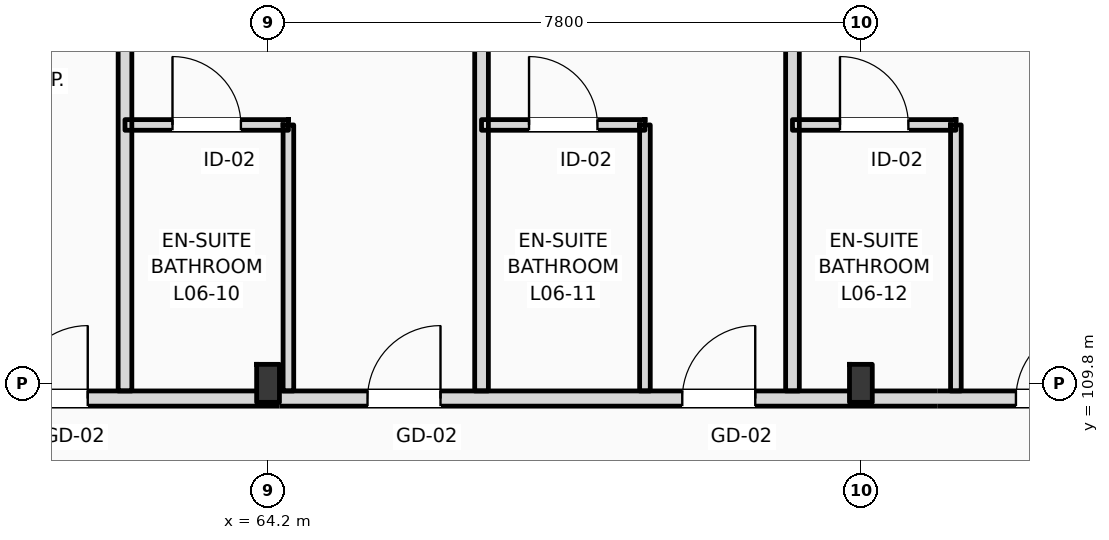
"""IFC4 building model, lengths in metres.
Left out: names, types, materials, properties, quantities, classifications, styles, units other than length and angle.
Written with IfcOpenShell. Run it as: python <this file> out.ifc"""

import sys

from ifc_helpers import new_model, si_unit, direction, frame, frame_2d, origin, origin_2d, place, context, subcontext, project, spatial, rectangle, i_section, extrude, element, fill, save


model = new_model("IFC4")
c1 = context("Model", 3, precision=1e-05, world=origin(), true_north=direction((0.0, 1.0)))
c2 = subcontext(c1, "Body", "Model", "MODEL_VIEW")
j1 = project(units=[si_unit("LENGTHUNIT", "METRE"), si_unit("PLANEANGLEUNIT", "RADIAN")], contexts=[c1])
p1 = place(None, origin())
s1 = spatial("IfcSite", under=j1, at=p1, CompositionType="ELEMENT")
p2 = place(p1, origin())
s2 = spatial("IfcBuilding", under=s1, at=p2, CompositionType="ELEMENT")
p3 = place(p2, frame((0.0, 0.0, 28.2)))
s3 = spatial("IfcBuildingStorey", under=s2, at=p3, CompositionType="ELEMENT", Elevation=28.2)
for number, where, z_axis, x_axis in (
    (1, (64.2, 109.8, 0.0), (0.0, 0.0, 1.0), (1.0, 0.0, 0.0)),
    (2, (72.0, 109.8, 0.0), (0.0, 0.0, 1.0), (1.0, 0.0, 0.0)),
):
    element("IfcColumn", number, at=place(p3, frame(where, z_axis=z_axis, x_axis=x_axis)), inside=s3, PredefinedType="COLUMN", context=c2, shape_type="SweptSolid", body=[
        extrude(i_section(OverallWidth=0.3, OverallDepth=0.5, WebThickness=0.014, FlangeThickness=0.028, FilletRadius=0.027, at=origin_2d()), origin(), (0.0, 0.0, 1.0), 3.6),
    ])
p4 = place(p3, frame((10.65, 109.6, 0.0), z_axis=(0.0, 0.0, 1.0), x_axis=(1.0, 0.0, 0.0)))
e3 = element("IfcWall", 3, at=p4, inside=s3, PredefinedType="PARTITIONING", context=c2, shape_type="SweptSolid", body=[
    extrude(rectangle(XDim=109.21, YDim=0.2, at=frame_2d((54.605, 0.0))), origin(), (0.0, 0.0, 1.0), 2.8),
])
p5 = place(p4, frame((12.611, 0.0, 0.0)))
e4 = element("IfcOpeningElement", 4, at=p5, cuts=e3, PredefinedType="OPENING", context=c2, shape_type="SweptSolid", body=[
    extrude(rectangle(XDim=1.02, YDim=2.2, at=frame_2d((0.51, 1.1))), frame((0.0, 0.11, 0.0), z_axis=(0.0, -1.0, 0.0), x_axis=(1.0, 0.0, 0.0)), (0.0, 0.0, 1.0), 0.22),
])
p6 = place(p4, frame((19.451, 0.0, 0.0)))
e5 = element("IfcOpeningElement", 5, at=p6, cuts=e3, PredefinedType="OPENING", context=c2, shape_type="SweptSolid", body=[
    extrude(rectangle(XDim=1.02, YDim=2.2, at=frame_2d((0.51, 1.1))), frame((0.0, 0.11, 0.0), z_axis=(0.0, -1.0, 0.0), x_axis=(1.0, 0.0, 0.0)), (0.0, 0.0, 1.0), 0.22),
])
p7 = place(p4, frame((23.842, 0.0, 0.0)))
e6 = element("IfcOpeningElement", 6, at=p7, cuts=e3, PredefinedType="OPENING", context=c2, shape_type="SweptSolid", body=[
    extrude(rectangle(XDim=1.02, YDim=2.2, at=frame_2d((0.51, 1.1))), frame((0.0, 0.11, 0.0), z_axis=(0.0, -1.0, 0.0), x_axis=(1.0, 0.0, 0.0)), (0.0, 0.0, 1.0), 0.22),
])
p8 = place(p4, frame((26.084, 0.0, 0.0)))
e7 = element("IfcOpeningElement", 7, at=p8, cuts=e3, PredefinedType="OPENING", context=c2, shape_type="SweptSolid", body=[
    extrude(rectangle(XDim=1.02, YDim=2.2, at=frame_2d((0.51, 1.1))), frame((0.0, 0.11, 0.0), z_axis=(0.0, -1.0, 0.0), x_axis=(1.0, 0.0, 0.0)), (0.0, 0.0, 1.0), 0.22),
])
p9 = place(p4, frame((32.655, 0.0, 0.0)))
e8 = element("IfcOpeningElement", 8, at=p9, cuts=e3, PredefinedType="OPENING", context=c2, shape_type="SweptSolid", body=[
    extrude(rectangle(XDim=0.96, YDim=2.2, at=frame_2d((0.48, 1.1))), frame((0.0, 0.11, 0.0), z_axis=(0.0, -1.0, 0.0), x_axis=(1.0, 0.0, 0.0)), (0.0, 0.0, 1.0), 0.22),
])
p10 = place(p4, frame((34.895, 0.0, 0.0)))
e9 = element("IfcOpeningElement", 9, at=p10, cuts=e3, PredefinedType="OPENING", context=c2, shape_type="SweptSolid", body=[
    extrude(rectangle(XDim=0.96, YDim=2.2, at=frame_2d((0.48, 1.1))), frame((0.0, 0.11, 0.0), z_axis=(0.0, -1.0, 0.0), x_axis=(1.0, 0.0, 0.0)), (0.0, 0.0, 1.0), 0.22),
])
p11 = place(p4, frame((41.436, 0.0, 0.0)))
e10 = element("IfcOpeningElement", 10, at=p11, cuts=e3, PredefinedType="OPENING", context=c2, shape_type="SweptSolid", body=[
    extrude(rectangle(XDim=0.96, YDim=2.2, at=frame_2d((0.48, 1.1))), frame((0.0, 0.11, 0.0), z_axis=(0.0, -1.0, 0.0), x_axis=(1.0, 0.0, 0.0)), (0.0, 0.0, 1.0), 0.22),
])
p12 = place(p4, frame((43.427, 0.0, 0.0)))
e11 = element("IfcOpeningElement", 11, at=p12, cuts=e3, PredefinedType="OPENING", context=c2, shape_type="SweptSolid", body=[
    extrude(rectangle(XDim=0.96, YDim=2.2, at=frame_2d((0.48, 1.1))), frame((0.0, 0.11, 0.0), z_axis=(0.0, -1.0, 0.0), x_axis=(1.0, 0.0, 0.0)), (0.0, 0.0, 1.0), 0.22),
])
p13 = place(p4, frame((50.218, 0.0, 0.0)))
e12 = element("IfcOpeningElement", 12, at=p13, cuts=e3, PredefinedType="OPENING", context=c2, shape_type="SweptSolid", body=[
    extrude(rectangle(XDim=0.96, YDim=2.2, at=frame_2d((0.48, 1.1))), frame((0.0, 0.11, 0.0), z_axis=(0.0, -1.0, 0.0), x_axis=(1.0, 0.0, 0.0)), (0.0, 0.0, 1.0), 0.22),
])
p14 = place(p4, frame((54.859, 0.0, 0.0)))
e13 = element("IfcOpeningElement", 13, at=p14, cuts=e3, PredefinedType="OPENING", context=c2, shape_type="SweptSolid", body=[
    extrude(rectangle(XDim=0.96, YDim=2.2, at=frame_2d((0.48, 1.1))), frame((0.0, 0.11, 0.0), z_axis=(0.0, -1.0, 0.0), x_axis=(1.0, 0.0, 0.0)), (0.0, 0.0, 1.0), 0.22),
])
p15 = place(p4, frame((59.0, 0.0, 0.0)))
e14 = element("IfcOpeningElement", 14, at=p15, cuts=e3, PredefinedType="OPENING", context=c2, shape_type="SweptSolid", body=[
    extrude(rectangle(XDim=0.96, YDim=2.2, at=frame_2d((0.48, 1.1))), frame((0.0, 0.11, 0.0), z_axis=(0.0, -1.0, 0.0), x_axis=(1.0, 0.0, 0.0)), (0.0, 0.0, 1.0), 0.22),
])
p16 = place(p4, frame((63.39, 0.0, 0.0)))
e15 = element("IfcOpeningElement", 15, at=p16, cuts=e3, PredefinedType="OPENING", context=c2, shape_type="SweptSolid", body=[
    extrude(rectangle(XDim=0.96, YDim=2.2, at=frame_2d((0.48, 1.1))), frame((0.0, 0.11, 0.0), z_axis=(0.0, -1.0, 0.0), x_axis=(1.0, 0.0, 0.0)), (0.0, 0.0, 1.0), 0.22),
])
p17 = place(p4, frame((65.631, 0.0, 0.0)))
e16 = element("IfcOpeningElement", 16, at=p17, cuts=e3, PredefinedType="OPENING", context=c2, shape_type="SweptSolid", body=[
    extrude(rectangle(XDim=0.96, YDim=2.2, at=frame_2d((0.48, 1.1))), frame((0.0, 0.11, 0.0), z_axis=(0.0, -1.0, 0.0), x_axis=(1.0, 0.0, 0.0)), (0.0, 0.0, 1.0), 0.22),
])
p18 = place(p4, frame((72.172, 0.0, 0.0)))
e17 = element("IfcOpeningElement", 17, at=p18, cuts=e3, PredefinedType="OPENING", context=c2, shape_type="SweptSolid", body=[
    extrude(rectangle(XDim=0.96, YDim=2.2, at=frame_2d((0.48, 1.1))), frame((0.0, 0.11, 0.0), z_axis=(0.0, -1.0, 0.0), x_axis=(1.0, 0.0, 0.0)), (0.0, 0.0, 1.0), 0.22),
])
p19 = place(p4, frame((74.413, 0.0, 0.0)))
e18 = element("IfcOpeningElement", 18, at=p19, cuts=e3, PredefinedType="OPENING", context=c2, shape_type="SweptSolid", body=[
    extrude(rectangle(XDim=0.96, YDim=2.2, at=frame_2d((0.48, 1.1))), frame((0.0, 0.11, 0.0), z_axis=(0.0, -1.0, 0.0), x_axis=(1.0, 0.0, 0.0)), (0.0, 0.0, 1.0), 0.22),
])
p20 = place(p4, frame((80.954, 0.0, 0.0)))
e19 = element("IfcOpeningElement", 19, at=p20, cuts=e3, PredefinedType="OPENING", context=c2, shape_type="SweptSolid", body=[
    extrude(rectangle(XDim=0.96, YDim=2.2, at=frame_2d((0.48, 1.1))), frame((0.0, 0.11, 0.0), z_axis=(0.0, -1.0, 0.0), x_axis=(1.0, 0.0, 0.0)), (0.0, 0.0, 1.0), 0.22),
])
p21 = place(p4, frame((83.195, 0.0, 0.0)))
e20 = element("IfcOpeningElement", 20, at=p21, cuts=e3, PredefinedType="OPENING", context=c2, shape_type="SweptSolid", body=[
    extrude(rectangle(XDim=0.96, YDim=2.2, at=frame_2d((0.48, 1.1))), frame((0.0, 0.11, 0.0), z_axis=(0.0, -1.0, 0.0), x_axis=(1.0, 0.0, 0.0)), (0.0, 0.0, 1.0), 0.22),
])
p22 = place(p4, frame((89.735, 0.0, 0.0)))
e21 = element("IfcOpeningElement", 21, at=p22, cuts=e3, PredefinedType="OPENING", context=c2, shape_type="SweptSolid", body=[
    extrude(rectangle(XDim=0.96, YDim=2.2, at=frame_2d((0.48, 1.1))), frame((0.0, 0.11, 0.0), z_axis=(0.0, -1.0, 0.0), x_axis=(1.0, 0.0, 0.0)), (0.0, 0.0, 1.0), 0.22),
])
p23 = place(p4, frame((94.126, 0.0, 0.0)))
e22 = element("IfcOpeningElement", 22, at=p23, cuts=e3, PredefinedType="OPENING", context=c2, shape_type="SweptSolid", body=[
    extrude(rectangle(XDim=0.96, YDim=2.2, at=frame_2d((0.48, 1.1))), frame((0.0, 0.11, 0.0), z_axis=(0.0, -1.0, 0.0), x_axis=(1.0, 0.0, 0.0)), (0.0, 0.0, 1.0), 0.22),
])
p24 = place(p4, frame((98.517, 0.0, 0.0)))
e23 = element("IfcOpeningElement", 23, at=p24, cuts=e3, PredefinedType="OPENING", context=c2, shape_type="SweptSolid", body=[
    extrude(rectangle(XDim=0.96, YDim=2.2, at=frame_2d((0.48, 1.1))), frame((0.0, 0.11, 0.0), z_axis=(0.0, -1.0, 0.0), x_axis=(1.0, 0.0, 0.0)), (0.0, 0.0, 1.0), 0.22),
])
p25 = place(p4, frame((102.908, 0.0, 0.0)))
e24 = element("IfcOpeningElement", 24, at=p25, cuts=e3, PredefinedType="OPENING", context=c2, shape_type="SweptSolid", body=[
    extrude(rectangle(XDim=0.96, YDim=2.2, at=frame_2d((0.48, 1.1))), frame((0.0, 0.11, 0.0), z_axis=(0.0, -1.0, 0.0), x_axis=(1.0, 0.0, 0.0)), (0.0, 0.0, 1.0), 0.22),
])
p26 = place(p4, frame((105.099, 0.0, 0.0)))
e25 = element("IfcOpeningElement", 25, at=p26, cuts=e3, PredefinedType="OPENING", context=c2, shape_type="SweptSolid", body=[
    extrude(rectangle(XDim=0.96, YDim=2.2, at=frame_2d((0.48, 1.1))), frame((0.0, 0.11, 0.0), z_axis=(0.0, -1.0, 0.0), x_axis=(1.0, 0.0, 0.0)), (0.0, 0.0, 1.0), 0.22),
])
p27 = place(p4, frame((2.716, 0.0, 0.0)))
e26 = element("IfcOpeningElement", 26, at=p27, cuts=e3, PredefinedType="OPENING", context=c2, shape_type="SweptSolid", body=[
    extrude(rectangle(XDim=1.35, YDim=2.25, at=frame_2d((0.675, 1.125))), frame((0.0, 0.11, 0.0), z_axis=(0.0, -1.0, 0.0), x_axis=(1.0, 0.0, 0.0)), (0.0, 0.0, 1.0), 0.22),
])
p28 = place(p4, frame((6.65, 0.0, 0.0)))
e27 = element("IfcOpeningElement", 27, at=p28, cuts=e3, PredefinedType="OPENING", context=c2, shape_type="SweptSolid", body=[
    extrude(rectangle(XDim=1.35, YDim=2.25, at=frame_2d((0.675, 1.125))), frame((0.0, 0.11, 0.0), z_axis=(0.0, -1.0, 0.0), x_axis=(1.0, 0.0, 0.0)), (0.0, 0.0, 1.0), 0.22),
])
p29 = place(p4, frame((10.583, 0.0, 0.0)))
e28 = element("IfcOpeningElement", 28, at=p29, cuts=e3, PredefinedType="OPENING", context=c2, shape_type="SweptSolid", body=[
    extrude(rectangle(XDim=1.35, YDim=2.25, at=frame_2d((0.675, 1.125))), frame((0.0, 0.11, 0.0), z_axis=(0.0, -1.0, 0.0), x_axis=(1.0, 0.0, 0.0)), (0.0, 0.0, 1.0), 0.22),
])
p30 = place(p3, frame((62.318, 109.7, 0.0), z_axis=(0.0, 0.0, 1.0), x_axis=(0.0, 1.0, 0.0)))
e29 = element("IfcWall", 29, at=p30, inside=s3, PredefinedType="PARTITIONING", context=c2, shape_type="SweptSolid", body=[
    extrude(rectangle(XDim=8.15, YDim=0.18, at=frame_2d((4.075, 0.0))), origin(), (0.0, 0.0, 1.0), 3.36),
])
p31 = place(p3, frame((67.009, 109.7, 0.0), z_axis=(0.0, 0.0, 1.0), x_axis=(0.0, 1.0, 0.0)))
e30 = element("IfcWall", 30, at=p31, inside=s3, PredefinedType="PARTITIONING", context=c2, shape_type="SweptSolid", body=[
    extrude(rectangle(XDim=8.15, YDim=0.18, at=frame_2d((4.075, 0.0))), origin(), (0.0, 0.0, 1.0), 3.05),
])
p32 = place(p3, frame((64.468, 109.7, 0.0), z_axis=(0.0, 0.0, 1.0), x_axis=(0.0, 1.0, 0.0)))
e31 = element("IfcWall", 31, at=p32, inside=s3, PredefinedType="PARTITIONING", context=c2, shape_type="SweptSolid", body=[
    extrude(rectangle(XDim=3.5, YDim=0.14, at=frame_2d((1.75, 0.0))), origin(), (0.0, 0.0, 1.0), 3.36),
])
p33 = place(p3, frame((62.318, 113.2, 0.0), z_axis=(0.0, 0.0, 1.0), x_axis=(1.0, 0.0, 0.0)))
e32 = element("IfcWall", 32, at=p33, inside=s3, PredefinedType="PARTITIONING", context=c2, shape_type="SweptSolid", body=[
    extrude(rectangle(XDim=2.15, YDim=0.14, at=frame_2d((1.075, 0.0))), origin(), (0.0, 0.0, 1.0), 3.36),
])
p34 = place(p33, frame((0.625, 0.0, 0.0)))
e33 = element("IfcOpeningElement", 33, at=p34, cuts=e32, PredefinedType="OPENING", context=c2, shape_type="SweptSolid", body=[
    extrude(rectangle(XDim=0.9, YDim=2.1, at=frame_2d((0.45, 1.05))), frame((0.0, 0.08, 0.0), z_axis=(0.0, -1.0, 0.0), x_axis=(1.0, 0.0, 0.0)), (0.0, 0.0, 1.0), 0.16),
])
p35 = place(p3, frame((71.1, 109.7, 0.0), z_axis=(0.0, 0.0, 1.0), x_axis=(0.0, 1.0, 0.0)))
e34 = element("IfcWall", 34, at=p35, inside=s3, PredefinedType="PARTITIONING", context=c2, shape_type="SweptSolid", body=[
    extrude(rectangle(XDim=8.15, YDim=0.18, at=frame_2d((4.075, 0.0))), origin(), (0.0, 0.0, 1.0), 3.36),
])
p36 = place(p3, frame((69.159, 109.7, 0.0), z_axis=(0.0, 0.0, 1.0), x_axis=(0.0, 1.0, 0.0)))
e35 = element("IfcWall", 35, at=p36, inside=s3, PredefinedType="PARTITIONING", context=c2, shape_type="SweptSolid", body=[
    extrude(rectangle(XDim=3.5, YDim=0.14, at=frame_2d((1.75, 0.0))), origin(), (0.0, 0.0, 1.0), 3.36),
])
p37 = place(p3, frame((67.009, 113.2, 0.0), z_axis=(0.0, 0.0, 1.0), x_axis=(1.0, 0.0, 0.0)))
e36 = element("IfcWall", 36, at=p37, inside=s3, PredefinedType="PARTITIONING", context=c2, shape_type="SweptSolid", body=[
    extrude(rectangle(XDim=2.15, YDim=0.14, at=frame_2d((1.075, 0.0))), origin(), (0.0, 0.0, 1.0), 3.36),
])
p38 = place(p37, frame((0.625, 0.0, 0.0)))
e37 = element("IfcOpeningElement", 37, at=p38, cuts=e36, PredefinedType="OPENING", context=c2, shape_type="SweptSolid", body=[
    extrude(rectangle(XDim=0.9, YDim=2.1, at=frame_2d((0.45, 1.05))), frame((0.0, 0.08, 0.0), z_axis=(0.0, -1.0, 0.0), x_axis=(1.0, 0.0, 0.0)), (0.0, 0.0, 1.0), 0.16),
])
p39 = place(p3, frame((73.25, 109.7, 0.0), z_axis=(0.0, 0.0, 1.0), x_axis=(0.0, 1.0, 0.0)))
e38 = element("IfcWall", 38, at=p39, inside=s3, PredefinedType="PARTITIONING", context=c2, shape_type="SweptSolid", body=[
    extrude(rectangle(XDim=3.5, YDim=0.14, at=frame_2d((1.75, 0.0))), origin(), (0.0, 0.0, 1.0), 3.36),
])
p40 = place(p3, frame((71.1, 113.2, 0.0), z_axis=(0.0, 0.0, 1.0), x_axis=(1.0, 0.0, 0.0)))
e39 = element("IfcWall", 39, at=p40, inside=s3, PredefinedType="PARTITIONING", context=c2, shape_type="SweptSolid", body=[
    extrude(rectangle(XDim=2.15, YDim=0.14, at=frame_2d((1.075, 0.0))), origin(), (0.0, 0.0, 1.0), 3.36),
])
p41 = place(p40, frame((0.625, 0.0, 0.0)))
e40 = element("IfcOpeningElement", 40, at=p41, cuts=e39, PredefinedType="OPENING", context=c2, shape_type="SweptSolid", body=[
    extrude(rectangle(XDim=0.9, YDim=2.1, at=frame_2d((0.45, 1.05))), frame((0.0, 0.08, 0.0), z_axis=(0.0, -1.0, 0.0), x_axis=(1.0, 0.0, 0.0)), (0.0, 0.0, 1.0), 0.16),
])
p42 = place(p13, origin())
e41 = element("IfcDoor", 41, at=p42, inside=s3, OperationType="SINGLE_SWING_RIGHT", PredefinedType="DOOR", context=c2, shape_type="SweptSolid", body=[
    extrude(rectangle(XDim=0.96, YDim=2.2, at=frame_2d((0.48, 1.1))), frame((0.0, 0.025, 0.0), z_axis=(0.0, -1.0, 0.0), x_axis=(1.0, 0.0, 0.0)), (0.0, 0.0, 1.0), 0.05),
])
fill(e12, e41)
p43 = place(p14, origin())
e42 = element("IfcDoor", 42, at=p43, inside=s3, OperationType="SINGLE_SWING_RIGHT", PredefinedType="DOOR", context=c2, shape_type="SweptSolid", body=[
    extrude(rectangle(XDim=0.96, YDim=2.2, at=frame_2d((0.48, 1.1))), frame((0.0, 0.025, 0.0), z_axis=(0.0, -1.0, 0.0), x_axis=(1.0, 0.0, 0.0)), (0.0, 0.0, 1.0), 0.05),
])
fill(e13, e42)
p44 = place(p34, origin())
e43 = element("IfcDoor", 43, at=p44, inside=s3, OperationType="SINGLE_SWING_LEFT", PredefinedType="DOOR", context=c2, shape_type="SweptSolid", body=[
    extrude(rectangle(XDim=0.9, YDim=2.1, at=frame_2d((0.45, 1.05))), frame((0.0, 0.025, 0.0), z_axis=(0.0, -1.0, 0.0), x_axis=(1.0, 0.0, 0.0)), (0.0, 0.0, 1.0), 0.05),
])
fill(e33, e43)
p45 = place(p15, origin())
e44 = element("IfcDoor", 44, at=p45, inside=s3, OperationType="SINGLE_SWING_RIGHT", PredefinedType="DOOR", context=c2, shape_type="SweptSolid", body=[
    extrude(rectangle(XDim=0.96, YDim=2.2, at=frame_2d((0.48, 1.1))), frame((0.0, 0.025, 0.0), z_axis=(0.0, -1.0, 0.0), x_axis=(1.0, 0.0, 0.0)), (0.0, 0.0, 1.0), 0.05),
])
fill(e14, e44)
p46 = place(p38, origin())
e45 = element("IfcDoor", 45, at=p46, inside=s3, OperationType="SINGLE_SWING_LEFT", PredefinedType="DOOR", context=c2, shape_type="SweptSolid", body=[
    extrude(rectangle(XDim=0.9, YDim=2.1, at=frame_2d((0.45, 1.05))), frame((0.0, 0.025, 0.0), z_axis=(0.0, -1.0, 0.0), x_axis=(1.0, 0.0, 0.0)), (0.0, 0.0, 1.0), 0.05),
])
fill(e37, e45)
p47 = place(p16, origin())
e46 = element("IfcDoor", 46, at=p47, inside=s3, OperationType="SINGLE_SWING_RIGHT", PredefinedType="DOOR", context=c2, shape_type="SweptSolid", body=[
    extrude(rectangle(XDim=0.96, YDim=2.2, at=frame_2d((0.48, 1.1))), frame((0.0, 0.025, 0.0), z_axis=(0.0, -1.0, 0.0), x_axis=(1.0, 0.0, 0.0)), (0.0, 0.0, 1.0), 0.05),
])
fill(e15, e46)
p48 = place(p41, origin())
e47 = element("IfcDoor", 47, at=p48, inside=s3, OperationType="SINGLE_SWING_LEFT", PredefinedType="DOOR", context=c2, shape_type="SweptSolid", body=[
    extrude(rectangle(XDim=0.9, YDim=2.1, at=frame_2d((0.45, 1.05))), frame((0.0, 0.025, 0.0), z_axis=(0.0, -1.0, 0.0), x_axis=(1.0, 0.0, 0.0)), (0.0, 0.0, 1.0), 0.05),
])
fill(e40, e47)
save(model, sys.argv[1])
